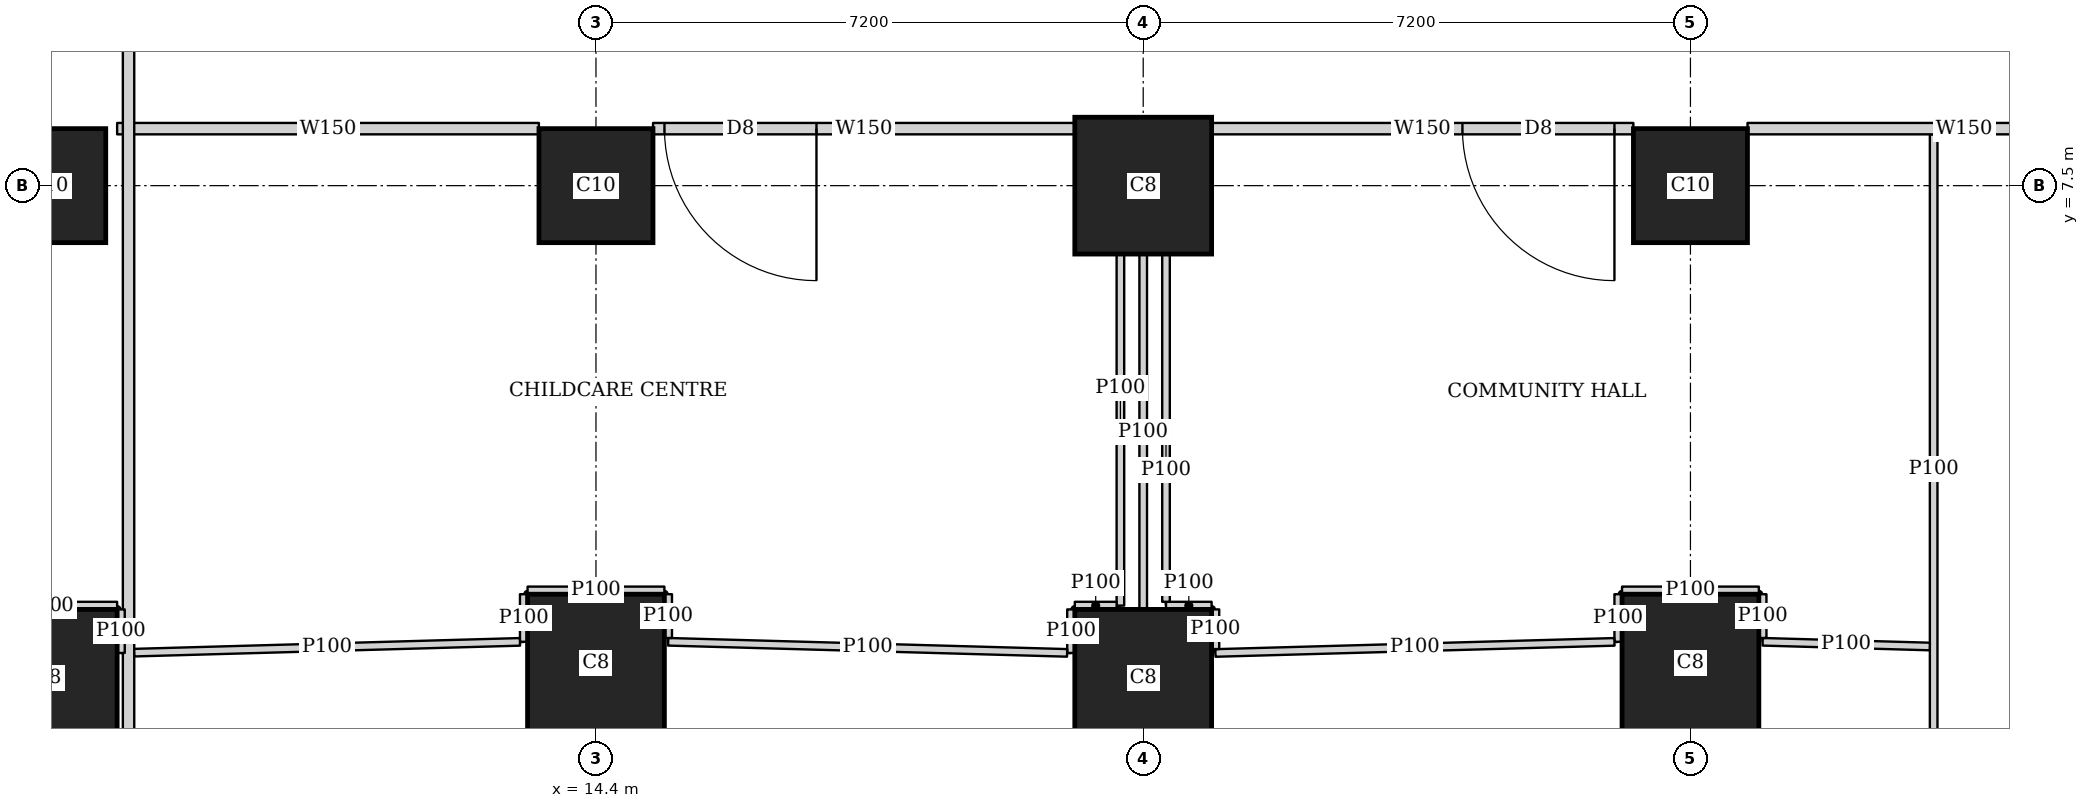
"""IFC4 building model, lengths in metres.
Left out: names, types, materials, properties, quantities, classifications, styles, units other than length and angle.
Written with IfcOpenShell. Run it as: python <this file> out.ifc"""

import sys

from ifc_helpers import new_model, si_unit, direction, frame, frame_2d, origin, origin_2d, place, context, subcontext, project, spatial, rectangle, extrude, element, fill, save


model = new_model("IFC4")
c1 = context("Model", 3, precision=1e-05, world=origin(), true_north=direction((0.0, 1.0)))
c2 = subcontext(c1, "Body", "Model", "MODEL_VIEW")
j1 = project(units=[si_unit("LENGTHUNIT", "METRE"), si_unit("PLANEANGLEUNIT", "RADIAN")], contexts=[c1])
p1 = place(None, origin())
s1 = spatial("IfcSite", under=j1, at=p1, CompositionType="ELEMENT")
p2 = place(p1, origin())
s2 = spatial("IfcBuilding", under=s1, at=p2, CompositionType="ELEMENT")
p3 = place(p2, frame((0.0, 0.0, 188.3)))
s3 = spatial("IfcBuildingStorey", under=s2, at=p3, CompositionType="ELEMENT", Elevation=188.3)
for number, where, z_axis, x_axis in (
    (1, (7.2, 1.025, 0.0), (0.0, 0.0, 1.0), (1.0, 0.0, 0.0)),
    (2, (14.4, 1.225, 0.0), (0.0, 0.0, 1.0), (1.0, 0.0, 0.0)),
    (3, (21.6, 1.025, 0.0), (0.0, 0.0, 1.0), (1.0, 0.0, 0.0)),
    (4, (28.8, 1.225, 0.0), (0.0, 0.0, 1.0), (1.0, 0.0, 0.0)),
):
    element("IfcColumn", number, at=place(p3, frame(where, z_axis=z_axis, x_axis=x_axis)), inside=s3, PredefinedType="COLUMN", context=c2, shape_type="SweptSolid", body=[
        extrude(rectangle(XDim=1.8, YDim=1.8, at=origin_2d()), origin(), (0.0, 0.0, 1.0), 5.4),
    ])
for number, where, z_axis, x_axis in (
    (5, (7.2, 7.5, 0.0), (0.0, 0.0, 1.0), (1.0, 0.0, 0.0)),
    (6, (14.4, 7.5, 0.0), (0.0, 0.0, 1.0), (1.0, 0.0, 0.0)),
):
    element("IfcColumn", number, at=place(p3, frame(where, z_axis=z_axis, x_axis=x_axis)), inside=s3, PredefinedType="COLUMN", context=c2, shape_type="SweptSolid", body=[
        extrude(rectangle(XDim=1.5, YDim=1.5, at=origin_2d()), origin(), (0.0, 0.0, 1.0), 5.4),
    ])
p4 = place(p3, frame((21.6, 7.5, 0.0), z_axis=(0.0, 0.0, 1.0), x_axis=(1.0, 0.0, 0.0)))
e7 = element("IfcColumn", 7, at=p4, inside=s3, PredefinedType="COLUMN", context=c2, shape_type="SweptSolid", body=[
    extrude(rectangle(XDim=1.8, YDim=1.8, at=origin_2d()), origin(), (0.0, 0.0, 1.0), 5.4),
])
p5 = place(p3, frame((28.8, 7.5, 0.0), z_axis=(0.0, 0.0, 1.0), x_axis=(1.0, 0.0, 0.0)))
e8 = element("IfcColumn", 8, at=p5, inside=s3, PredefinedType="COLUMN", context=c2, shape_type="SweptSolid", body=[
    extrude(rectangle(XDim=1.5, YDim=1.5, at=origin_2d()), origin(), (0.0, 0.0, 1.0), 5.4),
])
p6 = place(p3, frame((8.25, -0.637, 0.0), z_axis=(0.0, 0.0, 1.0), x_axis=(0.0, 1.0, 0.0)))
e9 = element("IfcWall", 9, at=p6, inside=s3, PredefinedType="SOLIDWALL", context=c2, shape_type="SweptSolid", body=[
    extrude(rectangle(XDim=46.275, YDim=0.15, at=frame_2d((23.137, 0.0))), origin(), (0.0, 0.0, 1.0), 3.35),
])
p7 = place(p6, frame((10.462, 0.0, 0.0)))
e10 = element("IfcOpeningElement", 10, at=p7, cuts=e9, PredefinedType="OPENING", context=c2, shape_type="SweptSolid", body=[
    extrude(rectangle(XDim=2.0, YDim=2.1, at=frame_2d((1.0, 1.05))), frame((0.0, 0.085, 0.0), z_axis=(0.0, -1.0, 0.0), x_axis=(1.0, 0.0, 0.0)), (0.0, 0.0, 1.0), 0.17),
])
p8 = place(p6, frame((34.312, 0.0, 0.0)))
e11 = element("IfcOpeningElement", 11, at=p8, cuts=e9, PredefinedType="OPENING", context=c2, shape_type="SweptSolid", body=[
    extrude(rectangle(XDim=1.0, YDim=2.1, at=frame_2d((0.5, 1.05))), frame((0.0, 0.085, 0.0), z_axis=(0.0, -1.0, 0.0), x_axis=(1.0, 0.0, 0.0)), (0.0, 0.0, 1.0), 0.17),
])
p9 = place(p3, frame((35.249, 8.25, 0.0), z_axis=(0.0, 0.0, 1.0), x_axis=(-1.0, 0.0, 0.0)))
e12 = element("IfcWall", 12, at=p9, inside=s3, PredefinedType="SOLIDWALL", context=c2, shape_type="SweptSolid", body=[
    extrude(rectangle(XDim=5.698, YDim=0.15, at=frame_2d((2.849, 0.0))), origin(), (0.0, 0.0, 1.0), 3.15),
])
p10 = place(p3, frame((28.049, 8.25, 0.0), z_axis=(0.0, 0.0, 1.0), x_axis=(-1.0, 0.0, 0.0)))
e13 = element("IfcWall", 13, at=p10, inside=s3, PredefinedType="SOLIDWALL", context=c2, shape_type="SweptSolid", body=[
    extrude(rectangle(XDim=5.548, YDim=0.15, at=frame_2d((2.774, 0.0))), origin(), (0.0, 0.0, 1.0), 3.15),
])
p11 = place(p10, frame((0.249, 0.0, 0.0)))
e14 = element("IfcOpeningElement", 14, at=p11, cuts=e13, PredefinedType="OPENING", context=c2, shape_type="SweptSolid", body=[
    extrude(rectangle(XDim=2.0, YDim=2.1, at=frame_2d((1.0, 1.05))), frame((0.0, 0.085, 0.0), z_axis=(0.0, -1.0, 0.0), x_axis=(1.0, 0.0, 0.0)), (0.0, 0.0, 1.0), 0.17),
])
p12 = place(p3, frame((20.699, 8.25, 0.0), z_axis=(0.0, 0.0, 1.0), x_axis=(-1.0, 0.0, 0.0)))
e15 = element("IfcWall", 15, at=p12, inside=s3, PredefinedType="SOLIDWALL", context=c2, shape_type="SweptSolid", body=[
    extrude(rectangle(XDim=5.548, YDim=0.15, at=frame_2d((2.774, 0.0))), origin(), (0.0, 0.0, 1.0), 3.15),
])
p13 = place(p12, frame((3.398, 0.0, 0.0)))
e16 = element("IfcOpeningElement", 16, at=p13, cuts=e15, PredefinedType="OPENING", context=c2, shape_type="SweptSolid", body=[
    extrude(rectangle(XDim=2.0, YDim=2.1, at=frame_2d((1.0, 1.05))), frame((0.0, 0.085, 0.0), z_axis=(0.0, -1.0, 0.0), x_axis=(1.0, 0.0, 0.0)), (0.0, 0.0, 1.0), 0.17),
])
p14 = place(p3, frame((13.649, 8.25, 0.0), z_axis=(0.0, 0.0, 1.0), x_axis=(-1.0, 0.0, 0.0)))
e17 = element("IfcWall", 17, at=p14, inside=s3, PredefinedType="SOLIDWALL", context=c2, shape_type="SweptSolid", body=[
    extrude(rectangle(XDim=5.549, YDim=0.15, at=frame_2d((2.774, 0.0))), origin(), (0.0, 0.0, 1.0), 3.55),
])
p15 = place(p3, frame((21.6, 1.926, 0.0), z_axis=(0.0, 0.0, 1.0), x_axis=(0.0, 1.0, 0.0)))
e18 = element("IfcWall", 18, at=p15, inside=s3, PredefinedType="PARTITIONING", context=c2, shape_type="SweptSolid", body=[
    extrude(rectangle(XDim=4.673, YDim=0.1, at=frame_2d((2.336, 0.0))), origin(), (0.0, 0.0, 1.0), 3.15),
])
p16 = place(p3, frame((32.0, -0.637, 0.0), z_axis=(0.0, 0.0, 1.0), x_axis=(0.0, 1.0, 0.0)))
e19 = element("IfcWall", 19, at=p16, inside=s3, PredefinedType="PARTITIONING", context=c2, shape_type="SweptSolid", body=[
    extrude(rectangle(XDim=8.812, YDim=0.1, at=frame_2d((4.406, 0.0))), origin(), (0.0, 0.0, 1.0), 3.35),
])
p17 = place(p3, frame((21.3, 6.599, 0.0), z_axis=(0.0, 0.0, 1.0), x_axis=(0.0, -1.0, 0.0)))
e20 = element("IfcWall", 20, at=p17, inside=s3, PredefinedType="PARTITIONING", context=c2, shape_type="SweptSolid", body=[
    extrude(rectangle(XDim=4.624, YDim=0.1, at=frame_2d((2.312, 0.0))), origin(), (0.0, 0.0, 1.0), 3.15),
])
p18 = place(p3, frame((21.25, 1.975, 0.0), z_axis=(0.0, 0.0, 1.0), x_axis=(-1.0, 0.0, 0.0)))
e21 = element("IfcWall", 21, at=p18, inside=s3, PredefinedType="PARTITIONING", context=c2, shape_type="SweptSolid", body=[
    extrude(rectangle(XDim=0.55, YDim=0.1, at=frame_2d((0.275, 0.0))), origin(), (0.0, 0.0, 1.0), 3.35),
])
p19 = place(p3, frame((20.65, 1.925, 0.0), z_axis=(0.0, 0.0, 1.0), x_axis=(0.0, -1.0, 0.0)))
e22 = element("IfcWall", 22, at=p19, inside=s3, PredefinedType="PARTITIONING", context=c2, shape_type="SweptSolid", body=[
    extrude(rectangle(XDim=0.573, YDim=0.1, at=frame_2d((0.287, 0.0))), origin(), (0.0, 0.0, 1.0), 3.35),
])
p20 = place(p3, frame((20.599, 1.353, 0.0), z_axis=(0.0, 0.0, 1.0), x_axis=(-0.999613416282, 0.027803201067, 0.0)))
e23 = element("IfcWall", 23, at=p20, inside=s3, PredefinedType="PARTITIONING", context=c2, shape_type="SweptSolid", body=[
    extrude(rectangle(XDim=5.251, YDim=0.1, at=frame_2d((2.625, 0.0))), origin(), (0.0, 0.0, 1.0), 3.35),
])
p21 = place(p3, frame((15.35, 1.549, 0.0), z_axis=(0.0, 0.0, 1.0), x_axis=(0.0, 1.0, 0.0)))
e24 = element("IfcWall", 24, at=p21, inside=s3, PredefinedType="PARTITIONING", context=c2, shape_type="SweptSolid", body=[
    extrude(rectangle(XDim=0.576, YDim=0.1, at=frame_2d((0.288, 0.0))), origin(), (0.0, 0.0, 1.0), 3.35),
])
p22 = place(p3, frame((15.3, 2.175, 0.0), z_axis=(0.0, 0.0, 1.0), x_axis=(-1.0, 0.0, 0.0)))
e25 = element("IfcWall", 25, at=p22, inside=s3, PredefinedType="PARTITIONING", context=c2, shape_type="SweptSolid", body=[
    extrude(rectangle(XDim=1.8, YDim=0.1, at=frame_2d((0.9, 0.0))), origin(), (0.0, 0.0, 1.0), 3.55),
])
p23 = place(p3, frame((13.45, 2.125, 0.0), z_axis=(0.0, 0.0, 1.0), x_axis=(0.0, -1.0, 0.0)))
e26 = element("IfcWall", 26, at=p23, inside=s3, PredefinedType="PARTITIONING", context=c2, shape_type="SweptSolid", body=[
    extrude(rectangle(XDim=0.626, YDim=0.1, at=frame_2d((0.313, 0.0))), origin(), (0.0, 0.0, 1.0), 3.35),
])
p24 = place(p3, frame((13.4, 1.498, 0.0), z_axis=(0.0, 0.0, 1.0), x_axis=(-0.999608128068, -0.027992682988, 0.0)))
e27 = element("IfcWall", 27, at=p24, inside=s3, PredefinedType="PARTITIONING", context=c2, shape_type="SweptSolid", body=[
    extrude(rectangle(XDim=5.076, YDim=0.1, at=frame_2d((2.538, 0.0))), origin(), (0.0, 0.0, 1.0), 3.35),
])
p25 = place(p3, frame((31.949, 1.437, 0.0), z_axis=(0.0, 0.0, 1.0), x_axis=(-0.999602608865, 0.02818908212, 0.0)))
e28 = element("IfcWall", 28, at=p25, inside=s3, PredefinedType="PARTITIONING", context=c2, shape_type="SweptSolid", body=[
    extrude(rectangle(XDim=2.2, YDim=0.1, at=frame_2d((1.1, 0.0))), origin(), (0.0, 0.0, 1.0), 3.35),
])
p26 = place(p3, frame((29.75, 1.549, 0.0), z_axis=(0.0, 0.0, 1.0), x_axis=(0.0, 1.0, 0.0)))
e29 = element("IfcWall", 29, at=p26, inside=s3, PredefinedType="PARTITIONING", context=c2, shape_type="SweptSolid", body=[
    extrude(rectangle(XDim=0.576, YDim=0.1, at=frame_2d((0.288, 0.0))), origin(), (0.0, 0.0, 1.0), 3.35),
])
p27 = place(p3, frame((29.7, 2.175, 0.0), z_axis=(0.0, 0.0, 1.0), x_axis=(-1.0, 0.0, 0.0)))
e30 = element("IfcWall", 30, at=p27, inside=s3, PredefinedType="PARTITIONING", context=c2, shape_type="SweptSolid", body=[
    extrude(rectangle(XDim=1.8, YDim=0.1, at=frame_2d((0.9, 0.0))), origin(), (0.0, 0.0, 1.0), 3.55),
])
p28 = place(p3, frame((27.85, 2.125, 0.0), z_axis=(0.0, 0.0, 1.0), x_axis=(0.0, -1.0, 0.0)))
e31 = element("IfcWall", 31, at=p28, inside=s3, PredefinedType="PARTITIONING", context=c2, shape_type="SweptSolid", body=[
    extrude(rectangle(XDim=0.626, YDim=0.1, at=frame_2d((0.313, 0.0))), origin(), (0.0, 0.0, 1.0), 3.35),
])
p29 = place(p3, frame((27.8, 1.498, 0.0), z_axis=(0.0, 0.0, 1.0), x_axis=(-0.999613560003, -0.027798033337, 0.0)))
e32 = element("IfcWall", 32, at=p29, inside=s3, PredefinedType="PARTITIONING", context=c2, shape_type="SweptSolid", body=[
    extrude(rectangle(XDim=5.252, YDim=0.1, at=frame_2d((2.626, 0.0))), origin(), (0.0, 0.0, 1.0), 3.35),
])
p30 = place(p3, frame((22.55, 1.403, 0.0), z_axis=(0.0, 0.0, 1.0), x_axis=(0.0, 1.0, 0.0)))
e33 = element("IfcWall", 33, at=p30, inside=s3, PredefinedType="PARTITIONING", context=c2, shape_type="SweptSolid", body=[
    extrude(rectangle(XDim=0.522, YDim=0.1, at=frame_2d((0.261, 0.0))), origin(), (0.0, 0.0, 1.0), 3.35),
])
p31 = place(p3, frame((22.5, 1.975, 0.0), z_axis=(0.0, 0.0, 1.0), x_axis=(-1.0, 0.0, 0.0)))
e34 = element("IfcWall", 34, at=p31, inside=s3, PredefinedType="PARTITIONING", context=c2, shape_type="SweptSolid", body=[
    extrude(rectangle(XDim=0.6, YDim=0.1, at=frame_2d((0.3, 0.0))), origin(), (0.0, 0.0, 1.0), 3.35),
])
p32 = place(p3, frame((21.9, 2.025, 0.0), z_axis=(0.0, 0.0, 1.0), x_axis=(0.0, 1.0, 0.0)))
e35 = element("IfcWall", 35, at=p32, inside=s3, PredefinedType="PARTITIONING", context=c2, shape_type="SweptSolid", body=[
    extrude(rectangle(XDim=4.574, YDim=0.1, at=frame_2d((2.287, 0.0))), origin(), (0.0, 0.0, 1.0), 3.15),
])
p33 = place(p3, frame((8.15, 1.352, 0.0), z_axis=(0.0, 0.0, 1.0), x_axis=(0.0, 1.0, 0.0)))
e36 = element("IfcWall", 36, at=p33, inside=s3, PredefinedType="PARTITIONING", context=c2, shape_type="SweptSolid", body=[
    extrude(rectangle(XDim=0.573, YDim=0.1, at=frame_2d((0.287, 0.0))), origin(), (0.0, 0.0, 1.0), 3.35),
])
p34 = place(p3, frame((8.1, 1.975, 0.0), z_axis=(0.0, 0.0, 1.0), x_axis=(-1.0, 0.0, 0.0)))
e37 = element("IfcWall", 37, at=p34, inside=s3, PredefinedType="PARTITIONING", context=c2, shape_type="SweptSolid", body=[
    extrude(rectangle(XDim=1.8, YDim=0.1, at=frame_2d((0.9, 0.0))), origin(), (0.0, 0.0, 1.0), 3.35),
])
p35 = place(p13, origin())
e38 = element("IfcDoor", 38, at=p35, inside=s3, OperationType="DOUBLE_DOOR_SINGLE_SWING", PredefinedType="DOOR", context=c2, shape_type="SweptSolid", body=[
    extrude(rectangle(XDim=2.0, YDim=2.1, at=frame_2d((1.0, 1.05))), frame((0.0, 0.025, 0.0), z_axis=(0.0, -1.0, 0.0), x_axis=(1.0, 0.0, 0.0)), (0.0, 0.0, 1.0), 0.05),
])
fill(e16, e38)
p36 = place(p11, origin())
e39 = element("IfcDoor", 39, at=p36, inside=s3, OperationType="DOUBLE_DOOR_SINGLE_SWING", PredefinedType="DOOR", context=c2, shape_type="SweptSolid", body=[
    extrude(rectangle(XDim=2.0, YDim=2.1, at=frame_2d((1.0, 1.05))), frame((0.0, 0.025, 0.0), z_axis=(0.0, -1.0, 0.0), x_axis=(1.0, 0.0, 0.0)), (0.0, 0.0, 1.0), 0.05),
])
fill(e14, e39)
save(model, sys.argv[1])
